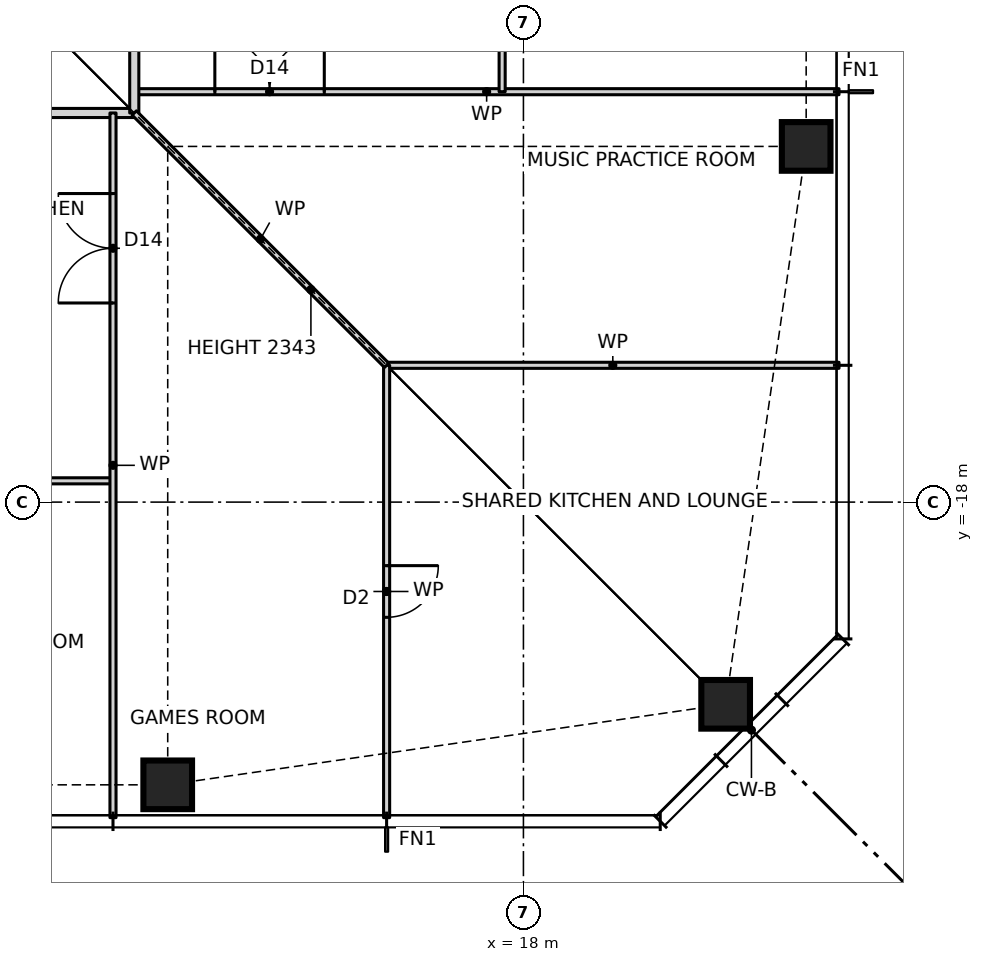
"""IFC4 building model, lengths in metres.
Left out: names, types, materials, properties, quantities, classifications, styles, units other than length and angle.
Written with IfcOpenShell. Run it as: python <this file> out.ifc"""

import sys

from ifc_helpers import new_model, si_unit, direction, frame, frame_2d, origin, origin_2d, place, context, subcontext, project, spatial, rectangle, hollow_rectangle, extrude, element, fill, save


model = new_model("IFC4")
c1 = context("Model", 3, precision=1e-05, world=origin(), true_north=direction((0.0, 1.0)))
c2 = subcontext(c1, "Body", "Model", "MODEL_VIEW")
j1 = project(units=[si_unit("LENGTHUNIT", "METRE"), si_unit("PLANEANGLEUNIT", "RADIAN")], contexts=[c1])
p1 = place(None, origin())
s1 = spatial("IfcSite", under=j1, at=p1, CompositionType="ELEMENT")
p2 = place(p1, origin())
s2 = spatial("IfcBuilding", under=s1, at=p2, CompositionType="ELEMENT")
p3 = place(p2, frame((0.0, 0.0, 43.0)))
s3 = spatial("IfcBuildingStorey", under=s2, at=p3, CompositionType="ELEMENT", Elevation=43.0)
for number, where, z_axis, x_axis in (
    (1, (12.15, -22.65, 0.0), (0.0, 0.0, 1.0), (1.0, 0.0, 0.0)),
    (2, (21.326, -21.326, 0.0), (0.0, 0.0, 1.0), (1.0, 0.0, 0.0)),
    (3, (22.65, -12.15, 0.0), (0.0, 0.0, 1.0), (1.0, 0.0, 0.0)),
):
    element("IfcColumn", number, at=place(p3, frame(where, z_axis=z_axis, x_axis=x_axis)), inside=s3, PredefinedType="COLUMN", context=c2, shape_type="SweptSolid", body=[
        extrude(hollow_rectangle(XDim=0.8, YDim=0.8, WallThickness=0.09, at=origin_2d()), origin(), (0.0, 0.0, 1.0), 3.5),
    ])
p4 = place(p3, frame((-15.75, -17.65, 0.0), z_axis=(0.0, 0.0, 1.0), x_axis=(1.0, 0.0, 0.0)))
e4 = element("IfcWall", 4, at=p4, inside=s3, PredefinedType="PARTITIONING", context=c2, shape_type="SweptSolid", body=[
    extrude(rectangle(XDim=27.0, YDim=0.1, at=frame_2d((13.5, 0.0))), origin(), (0.0, 0.0, 1.0), 3.0),
])
p5 = place(p4, frame((1.8, 0.0, 0.0)))
e5 = element("IfcOpeningElement", 5, at=p5, cuts=e4, PredefinedType="OPENING", context=c2, shape_type="SweptSolid", body=[
    extrude(rectangle(XDim=0.9, YDim=2.1, at=frame_2d((0.45, 1.05))), frame((0.0, 0.06, 0.0), z_axis=(0.0, -1.0, 0.0), x_axis=(1.0, 0.0, 0.0)), (0.0, 0.0, 1.0), 0.12),
])
p6 = place(p4, frame((6.3, 0.0, 0.0)))
e6 = element("IfcOpeningElement", 6, at=p6, cuts=e4, PredefinedType="OPENING", context=c2, shape_type="SweptSolid", body=[
    extrude(rectangle(XDim=0.9, YDim=2.1, at=frame_2d((0.45, 1.05))), frame((0.0, 0.06, 0.0), z_axis=(0.0, -1.0, 0.0), x_axis=(1.0, 0.0, 0.0)), (0.0, 0.0, 1.0), 0.12),
])
p7 = place(p4, frame((10.8, 0.0, 0.0)))
e7 = element("IfcOpeningElement", 7, at=p7, cuts=e4, PredefinedType="OPENING", context=c2, shape_type="SweptSolid", body=[
    extrude(rectangle(XDim=0.9, YDim=2.1, at=frame_2d((0.45, 1.05))), frame((0.0, 0.06, 0.0), z_axis=(0.0, -1.0, 0.0), x_axis=(1.0, 0.0, 0.0)), (0.0, 0.0, 1.0), 0.12),
])
p8 = place(p4, frame((15.3, 0.0, 0.0)))
e8 = element("IfcOpeningElement", 8, at=p8, cuts=e4, PredefinedType="OPENING", context=c2, shape_type="SweptSolid", body=[
    extrude(rectangle(XDim=0.9, YDim=2.1, at=frame_2d((0.45, 1.05))), frame((0.0, 0.06, 0.0), z_axis=(0.0, -1.0, 0.0), x_axis=(1.0, 0.0, 0.0)), (0.0, 0.0, 1.0), 0.12),
])
p9 = place(p4, frame((19.8, 0.0, 0.0)))
e9 = element("IfcOpeningElement", 9, at=p9, cuts=e4, PredefinedType="OPENING", context=c2, shape_type="SweptSolid", body=[
    extrude(rectangle(XDim=0.9, YDim=2.1, at=frame_2d((0.45, 1.05))), frame((0.0, 0.06, 0.0), z_axis=(0.0, -1.0, 0.0), x_axis=(1.0, 0.0, 0.0)), (0.0, 0.0, 1.0), 0.12),
])
p10 = place(p4, frame((24.3, 0.0, 0.0)))
e10 = element("IfcOpeningElement", 10, at=p10, cuts=e4, PredefinedType="OPENING", context=c2, shape_type="SweptSolid", body=[
    extrude(rectangle(XDim=0.9, YDim=2.1, at=frame_2d((0.45, 1.05))), frame((0.0, 0.06, 0.0), z_axis=(0.0, -1.0, 0.0), x_axis=(1.0, 0.0, 0.0)), (0.0, 0.0, 1.0), 0.12),
])
p11 = place(p3, frame((15.75, -15.75, 0.0), z_axis=(0.0, 0.0, 1.0), x_axis=(1.0, 0.0, 0.0)))
e11 = element("IfcWall", 11, at=p11, inside=s3, PredefinedType="PARTITIONING", context=c2, shape_type="SweptSolid", body=[
    extrude(rectangle(XDim=7.44, YDim=0.1, at=frame_2d((3.72, 0.0))), origin(), (0.0, 0.0, 1.0), 3.27),
])
p12 = place(p3, frame((-11.6, -11.6, 0.0), z_axis=(0.0, 0.0, 1.0), x_axis=(1.0, 0.0, 0.0)))
e12 = element("IfcWall", 12, at=p12, inside=s3, PredefinedType="PARTITIONING", context=c2, shape_type="SweptSolid", body=[
    extrude(rectangle(XDim=23.2, YDim=0.15, at=frame_2d((11.6, 0.0))), origin(), (0.0, 0.0, 1.0), 3.27),
])
p13 = place(p12, frame((2.975, 0.0, 0.0)))
e13 = element("IfcOpeningElement", 13, at=p13, cuts=e12, PredefinedType="OPENING", context=c2, shape_type="SweptSolid", body=[
    extrude(rectangle(XDim=1.0, YDim=2.1, at=frame_2d((0.5, 1.05))), frame((0.0, 0.085, 0.0), z_axis=(0.0, -1.0, 0.0), x_axis=(1.0, 0.0, 0.0)), (0.0, 0.0, 1.0), 0.17),
])
p14 = place(p12, frame((18.6, 0.0, 0.0)))
e14 = element("IfcOpeningElement", 14, at=p14, cuts=e12, PredefinedType="OPENING", context=c2, shape_type="SweptSolid", body=[
    extrude(rectangle(XDim=1.0, YDim=2.1, at=frame_2d((0.5, 1.05))), frame((0.0, 0.085, 0.0), z_axis=(0.0, -1.0, 0.0), x_axis=(1.0, 0.0, 0.0)), (0.0, 0.0, 1.0), 0.17),
])
p15 = place(p3, frame((11.6, -11.25, 0.0), z_axis=(0.0, 0.0, 1.0), x_axis=(1.0, 0.0, 0.0)))
e15 = element("IfcWall", 15, at=p15, inside=s3, PredefinedType="PARTITIONING", context=c2, shape_type="SweptSolid", body=[
    extrude(rectangle(XDim=11.59, YDim=0.1, at=frame_2d((5.795, 0.0))), origin(), (0.0, 0.0, 1.0), 3.27),
])
p16 = place(p15, frame((1.325, 0.0, 0.0)))
e16 = element("IfcOpeningElement", 16, at=p16, cuts=e15, PredefinedType="OPENING", context=c2, shape_type="SweptSolid", body=[
    extrude(rectangle(XDim=1.8, YDim=2.1, at=frame_2d((0.9, 1.05))), frame((0.0, 0.06, 0.0), z_axis=(0.0, -1.0, 0.0), x_axis=(1.0, 0.0, 0.0)), (0.0, 0.0, 1.0), 0.12),
])
p17 = place(p3, frame((17.65, -11.25, 0.0), z_axis=(0.0, 0.0, 1.0), x_axis=(0.0, 1.0, 0.0)))
e17 = element("IfcWall", 17, at=p17, inside=s3, PredefinedType="PARTITIONING", context=c2, shape_type="SweptSolid", body=[
    extrude(rectangle(XDim=27.0, YDim=0.1, at=frame_2d((13.5, 0.0))), origin(), (0.0, 0.0, 1.0), 3.0),
])
p18 = place(p17, frame((1.8, 0.0, 0.0)))
e18 = element("IfcOpeningElement", 18, at=p18, cuts=e17, PredefinedType="OPENING", context=c2, shape_type="SweptSolid", body=[
    extrude(rectangle(XDim=0.9, YDim=2.1, at=frame_2d((0.45, 1.05))), frame((0.0, 0.06, 0.0), z_axis=(0.0, -1.0, 0.0), x_axis=(1.0, 0.0, 0.0)), (0.0, 0.0, 1.0), 0.12),
])
p19 = place(p17, frame((6.3, 0.0, 0.0)))
e19 = element("IfcOpeningElement", 19, at=p19, cuts=e17, PredefinedType="OPENING", context=c2, shape_type="SweptSolid", body=[
    extrude(rectangle(XDim=0.9, YDim=2.1, at=frame_2d((0.45, 1.05))), frame((0.0, 0.06, 0.0), z_axis=(0.0, -1.0, 0.0), x_axis=(1.0, 0.0, 0.0)), (0.0, 0.0, 1.0), 0.12),
])
p20 = place(p17, frame((10.8, 0.0, 0.0)))
e20 = element("IfcOpeningElement", 20, at=p20, cuts=e17, PredefinedType="OPENING", context=c2, shape_type="SweptSolid", body=[
    extrude(rectangle(XDim=0.9, YDim=2.1, at=frame_2d((0.45, 1.05))), frame((0.0, 0.06, 0.0), z_axis=(0.0, -1.0, 0.0), x_axis=(1.0, 0.0, 0.0)), (0.0, 0.0, 1.0), 0.12),
])
p21 = place(p17, frame((15.3, 0.0, 0.0)))
e21 = element("IfcOpeningElement", 21, at=p21, cuts=e17, PredefinedType="OPENING", context=c2, shape_type="SweptSolid", body=[
    extrude(rectangle(XDim=0.9, YDim=2.1, at=frame_2d((0.45, 1.05))), frame((0.0, 0.06, 0.0), z_axis=(0.0, -1.0, 0.0), x_axis=(1.0, 0.0, 0.0)), (0.0, 0.0, 1.0), 0.12),
])
p22 = place(p17, frame((19.8, 0.0, 0.0)))
e22 = element("IfcOpeningElement", 22, at=p22, cuts=e17, PredefinedType="OPENING", context=c2, shape_type="SweptSolid", body=[
    extrude(rectangle(XDim=0.9, YDim=2.1, at=frame_2d((0.45, 1.05))), frame((0.0, 0.06, 0.0), z_axis=(0.0, -1.0, 0.0), x_axis=(1.0, 0.0, 0.0)), (0.0, 0.0, 1.0), 0.12),
])
p23 = place(p17, frame((24.3, 0.0, 0.0)))
e23 = element("IfcOpeningElement", 23, at=p23, cuts=e17, PredefinedType="OPENING", context=c2, shape_type="SweptSolid", body=[
    extrude(rectangle(XDim=0.9, YDim=2.1, at=frame_2d((0.45, 1.05))), frame((0.0, 0.06, 0.0), z_axis=(0.0, -1.0, 0.0), x_axis=(1.0, 0.0, 0.0)), (0.0, 0.0, 1.0), 0.12),
])
p24 = place(p3, frame((15.75, -23.19, 0.0), z_axis=(0.0, 0.0, 1.0), x_axis=(0.0, 1.0, 0.0)))
e24 = element("IfcWall", 24, at=p24, inside=s3, PredefinedType="PARTITIONING", context=c2, shape_type="SweptSolid", body=[
    extrude(rectangle(XDim=7.44, YDim=0.1, at=frame_2d((3.72, 0.0))), origin(), (0.0, 0.0, 1.0), 3.27),
])
p25 = place(p24, frame((3.295, 0.0, 0.0)))
e25 = element("IfcOpeningElement", 25, at=p25, cuts=e24, PredefinedType="OPENING", context=c2, shape_type="SweptSolid", body=[
    extrude(rectangle(XDim=0.85, YDim=2.1, at=frame_2d((0.425, 1.05))), frame((0.0, 0.06, 0.0), z_axis=(0.0, -1.0, 0.0), x_axis=(1.0, 0.0, 0.0)), (0.0, 0.0, 1.0), 0.12),
])
p26 = place(p3, frame((11.6, -11.6, 0.0), z_axis=(0.0, 0.0, 1.0), x_axis=(0.0, 1.0, 0.0)))
e26 = element("IfcWall", 26, at=p26, inside=s3, PredefinedType="PARTITIONING", context=c2, shape_type="SweptSolid", body=[
    extrude(rectangle(XDim=24.2, YDim=0.15, at=frame_2d((12.1, 0.0))), origin(), (0.0, 0.0, 1.0), 3.27),
])
p27 = place(p26, frame((3.6, 0.0, 0.0)))
e27 = element("IfcOpeningElement", 27, at=p27, cuts=e26, PredefinedType="OPENING", context=c2, shape_type="SweptSolid", body=[
    extrude(rectangle(XDim=1.0, YDim=2.1, at=frame_2d((0.5, 1.05))), frame((0.0, 0.085, 0.0), z_axis=(0.0, -1.0, 0.0), x_axis=(1.0, 0.0, 0.0)), (0.0, 0.0, 1.0), 0.17),
])
p28 = place(p26, frame((21.025, 0.0, 0.0)))
e28 = element("IfcOpeningElement", 28, at=p28, cuts=e26, PredefinedType="OPENING", context=c2, shape_type="SweptSolid", body=[
    extrude(rectangle(XDim=1.0, YDim=2.1, at=frame_2d((0.5, 1.05))), frame((0.0, 0.085, 0.0), z_axis=(0.0, -1.0, 0.0), x_axis=(1.0, 0.0, 0.0)), (0.0, 0.0, 1.0), 0.17),
])
p29 = place(p3, frame((11.25, -23.19, 0.0), z_axis=(0.0, 0.0, 1.0), x_axis=(0.0, 1.0, 0.0)))
e29 = element("IfcWall", 29, at=p29, inside=s3, PredefinedType="PARTITIONING", context=c2, shape_type="SweptSolid", body=[
    extrude(rectangle(XDim=11.59, YDim=0.1, at=frame_2d((5.795, 0.0))), origin(), (0.0, 0.0, 1.0), 3.27),
])
p30 = place(p29, frame((8.465, 0.0, 0.0)))
e30 = element("IfcOpeningElement", 30, at=p30, cuts=e29, PredefinedType="OPENING", context=c2, shape_type="SweptSolid", body=[
    extrude(rectangle(XDim=1.8, YDim=2.1, at=frame_2d((0.9, 1.05))), frame((0.0, 0.06, 0.0), z_axis=(0.0, -1.0, 0.0), x_axis=(1.0, 0.0, 0.0)), (0.0, 0.0, 1.0), 0.12),
])
p31 = place(p3, frame((15.75, -15.75, 0.0), z_axis=(0.0, 0.0, 1.0), x_axis=(-0.707106781187, 0.707106781187, 0.0)))
e31 = element("IfcWall", 31, at=p31, inside=s3, PredefinedType="PARTITIONING", context=c2, shape_type="SweptSolid", body=[
    extrude(rectangle(XDim=5.869, YDim=0.1, at=frame_2d((2.935, 0.0))), origin(), (0.0, 0.0, 1.0), 2.343),
])
p32 = place(p30, origin())
e32 = element("IfcDoor", 32, at=p32, inside=s3, OperationType="DOUBLE_DOOR_SINGLE_SWING", PredefinedType="DOOR", context=c2, shape_type="SweptSolid", body=[
    extrude(rectangle(XDim=1.8, YDim=2.1, at=frame_2d((0.9, 1.05))), frame((0.0, 0.025, 0.0), z_axis=(0.0, -1.0, 0.0), x_axis=(1.0, 0.0, 0.0)), (0.0, 0.0, 1.0), 0.05),
])
fill(e30, e32)
p33 = place(p16, origin())
e33 = element("IfcDoor", 33, at=p33, inside=s3, OperationType="DOUBLE_DOOR_SINGLE_SWING", PredefinedType="DOOR", context=c2, shape_type="SweptSolid", body=[
    extrude(rectangle(XDim=1.8, YDim=2.1, at=frame_2d((0.9, 1.05))), frame((0.0, 0.025, 0.0), z_axis=(0.0, -1.0, 0.0), x_axis=(1.0, 0.0, 0.0)), (0.0, 0.0, 1.0), 0.05),
])
fill(e16, e33)
p34 = place(p25, frame((0.85, 0.0, 0.0), z_axis=(0.0, 0.0, 1.0), x_axis=(-1.0, 0.0, 0.0)))
e34 = element("IfcDoor", 34, at=p34, inside=s3, OperationType="SINGLE_SWING_LEFT", PredefinedType="DOOR", context=c2, shape_type="SweptSolid", body=[
    extrude(rectangle(XDim=0.85, YDim=2.1, at=frame_2d((0.425, 1.05))), frame((0.0, 0.025, 0.0), z_axis=(0.0, -1.0, 0.0), x_axis=(1.0, 0.0, 0.0)), (0.0, 0.0, 1.0), 0.05),
])
fill(e25, e34)
save(model, sys.argv[1])
